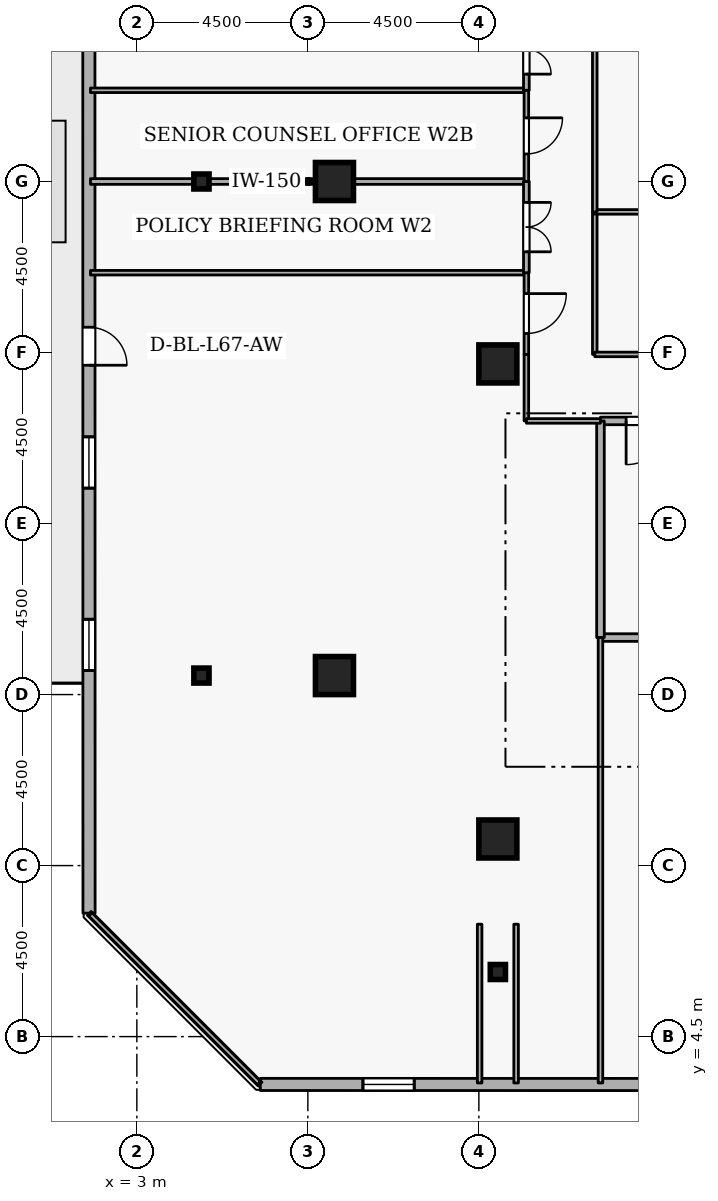
"""IFC4 building model, lengths in metres.
Left out: names, types, materials, properties, quantities, classifications, styles, units other than length and angle.
Written with IfcOpenShell. Run it as: python <this file> out.ifc"""

import sys

from ifc_helpers import new_model, si_unit, direction, frame, frame_2d, origin, origin_2d, place, context, subcontext, project, spatial, rectangle, i_section, extrude, element, fill, save


model = new_model("IFC4")
c1 = context("Model", 3, precision=1e-05, world=origin(), true_north=direction((0.0, 1.0)))
c2 = subcontext(c1, "Body", "Model", "MODEL_VIEW")
j1 = project(units=[si_unit("LENGTHUNIT", "METRE"), si_unit("PLANEANGLEUNIT", "RADIAN")], contexts=[c1])
p1 = place(None, origin())
s1 = spatial("IfcSite", under=j1, at=p1, CompositionType="ELEMENT")
p2 = place(p1, origin())
s2 = spatial("IfcBuilding", under=s1, at=p2, CompositionType="ELEMENT")
p3 = place(p2, frame((0.0, 0.0, 251.1)))
s3 = spatial("IfcBuildingStorey", under=s2, at=p3, CompositionType="ELEMENT", Elevation=251.1)
for number, where, z_axis, x_axis in (
    (1, (12.5, 9.7, 0.0), (0.0, 0.0, 1.0), (1.0, 0.0, 0.0)),
    (2, (8.2, 14.0, 0.0), (0.0, 0.0, 1.0), (1.0, 0.0, 0.0)),
    (3, (8.2, 27.0, 0.0), (0.0, 0.0, 1.0), (1.0, 0.0, 0.0)),
    (4, (12.5, 22.2, 0.0), (0.0, 0.0, 1.0), (1.0, 0.0, 0.0)),
):
    element("IfcColumn", number, at=place(p3, frame(where, z_axis=z_axis, x_axis=x_axis)), inside=s3, PredefinedType="COLUMN", context=c2, shape_type="SweptSolid", body=[
        extrude(rectangle(XDim=1.0, YDim=1.0, at=origin_2d()), origin(), (0.0, 0.0, 1.0), 3.6),
    ])
for number, where, z_axis, x_axis in (
    (5, (12.5, 6.2, 0.0), (0.0, 0.0, 1.0), (1.0, 0.0, 0.0)),
    (6, (4.7, 14.0, 0.0), (0.0, 0.0, 1.0), (1.0, 0.0, 0.0)),
    (7, (4.7, 27.0, 0.0), (0.0, 0.0, 1.0), (1.0, 0.0, 0.0)),
):
    element("IfcColumn", number, at=place(p3, frame(where, z_axis=z_axis, x_axis=x_axis)), inside=s3, PredefinedType="COLUMN", context=c2, shape_type="SweptSolid", body=[
        extrude(i_section(OverallWidth=0.399, OverallDepth=0.394, WebThickness=0.023, FlangeThickness=0.037, FilletRadius=0.015, at=origin_2d()), origin(), (0.0, 0.0, 1.0), 3.6),
    ])
p4 = place(p3, frame((6.249, 3.242, 0.0), z_axis=(0.0, 0.0, 1.0), x_axis=(0.999999983007, -0.000184351399, 0.0)))
e8 = element("IfcWall", 8, at=p4, inside=s3, PredefinedType="STANDARD", context=c2, shape_type="SweptSolid", body=[
    extrude(rectangle(XDim=34.432, YDim=0.32, at=frame_2d((17.216, 0.0))), origin(), (0.0, 0.0, 1.0), 2.22),
])
p5 = place(p4, frame((2.7, 0.0, 0.72)))
e9 = element("IfcOpeningElement", 9, at=p5, cuts=e8, PredefinedType="OPENING", context=c2, shape_type="SweptSolid", body=[
    extrude(rectangle(XDim=1.35, YDim=1.05, at=frame_2d((0.675, 0.525))), frame((0.0, 0.17, 0.0), z_axis=(0.0, -1.0, 0.0), x_axis=(1.0, 0.0, 0.0)), (0.0, 0.0, 1.0), 0.34),
])
p6 = place(p4, frame((12.3, 0.0, 0.72)))
e10 = element("IfcOpeningElement", 10, at=p6, cuts=e8, PredefinedType="OPENING", context=c2, shape_type="SweptSolid", body=[
    extrude(rectangle(XDim=1.35, YDim=1.05, at=frame_2d((0.675, 0.525))), frame((0.0, 0.17, 0.0), z_axis=(0.0, -1.0, 0.0), x_axis=(1.0, 0.0, 0.0)), (0.0, 0.0, 1.0), 0.34),
])
p7 = place(p4, frame((17.1, 0.0, 0.72)))
e11 = element("IfcOpeningElement", 11, at=p7, cuts=e8, PredefinedType="OPENING", context=c2, shape_type="SweptSolid", body=[
    extrude(rectangle(XDim=1.35, YDim=1.05, at=frame_2d((0.675, 0.525))), frame((0.0, 0.17, 0.0), z_axis=(0.0, -1.0, 0.0), x_axis=(1.0, 0.0, 0.0)), (0.0, 0.0, 1.0), 0.34),
])
p8 = place(p4, frame((21.9, 0.0, 0.72)))
e12 = element("IfcOpeningElement", 12, at=p8, cuts=e8, PredefinedType="OPENING", context=c2, shape_type="SweptSolid", body=[
    extrude(rectangle(XDim=1.35, YDim=1.05, at=frame_2d((0.675, 0.525))), frame((0.0, 0.17, 0.0), z_axis=(0.0, -1.0, 0.0), x_axis=(1.0, 0.0, 0.0)), (0.0, 0.0, 1.0), 0.34),
])
p9 = place(p3, frame((1.735, 42.181, 0.0), z_axis=(0.0, 0.0, 1.0), x_axis=(0.000184351399, -0.999999983007, 0.0)))
e13 = element("IfcWall", 13, at=p9, inside=s3, PredefinedType="STANDARD", context=c2, shape_type="SweptSolid", body=[
    extrude(rectangle(XDim=34.432, YDim=0.32, at=frame_2d((17.216, 0.0))), origin(), (0.0, 0.0, 1.0), 2.22),
])
p10 = place(p9, frame((19.016, 0.0, 0.0)))
e14 = element("IfcOpeningElement", 14, at=p10, cuts=e13, PredefinedType="OPENING", context=c2, shape_type="SweptSolid", body=[
    extrude(rectangle(XDim=1.0, YDim=2.08, at=frame_2d((0.5, 1.04))), frame((0.0, 0.17, 0.0), z_axis=(0.0, -1.0, 0.0), x_axis=(1.0, 0.0, 0.0)), (0.0, 0.0, 1.0), 0.34),
])
p11 = place(p9, frame((2.7, 0.0, 0.72)))
e15 = element("IfcOpeningElement", 15, at=p11, cuts=e13, PredefinedType="OPENING", context=c2, shape_type="SweptSolid", body=[
    extrude(rectangle(XDim=1.35, YDim=1.05, at=frame_2d((0.675, 0.525))), frame((0.0, 0.17, 0.0), z_axis=(0.0, -1.0, 0.0), x_axis=(1.0, 0.0, 0.0)), (0.0, 0.0, 1.0), 0.34),
])
p12 = place(p9, frame((7.5, 0.0, 0.72)))
e16 = element("IfcOpeningElement", 16, at=p12, cuts=e13, PredefinedType="OPENING", context=c2, shape_type="SweptSolid", body=[
    extrude(rectangle(XDim=1.35, YDim=1.05, at=frame_2d((0.675, 0.525))), frame((0.0, 0.17, 0.0), z_axis=(0.0, -1.0, 0.0), x_axis=(1.0, 0.0, 0.0)), (0.0, 0.0, 1.0), 0.34),
])
p13 = place(p9, frame((21.9, 0.0, 0.72)))
e17 = element("IfcOpeningElement", 17, at=p13, cuts=e13, PredefinedType="OPENING", context=c2, shape_type="SweptSolid", body=[
    extrude(rectangle(XDim=1.35, YDim=1.05, at=frame_2d((0.675, 0.525))), frame((0.0, 0.17, 0.0), z_axis=(0.0, -1.0, 0.0), x_axis=(1.0, 0.0, 0.0)), (0.0, 0.0, 1.0), 0.34),
])
p14 = place(p9, frame((26.7, 0.0, 0.72)))
e18 = element("IfcOpeningElement", 18, at=p14, cuts=e13, PredefinedType="OPENING", context=c2, shape_type="SweptSolid", body=[
    extrude(rectangle(XDim=1.35, YDim=1.05, at=frame_2d((0.675, 0.525))), frame((0.0, 0.17, 0.0), z_axis=(0.0, -1.0, 0.0), x_axis=(1.0, 0.0, 0.0)), (0.0, 0.0, 1.0), 0.34),
])
p15 = place(p3, frame((15.2, 15.0, 0.0), z_axis=(0.0, 0.0, 1.0), x_axis=(1.0, 0.0, 0.0)))
e19 = element("IfcWall", 19, at=p15, inside=s3, PredefinedType="STANDARD", context=c2, shape_type="SweptSolid", body=[
    extrude(rectangle(XDim=2.5, YDim=0.2, at=frame_2d((1.25, 0.0))), origin(), (0.0, 0.0, 1.0), 3.32),
])
p16 = place(p3, frame((17.7, 20.7, 0.0), z_axis=(0.0, 0.0, 1.0), x_axis=(-1.0, 0.0, 0.0)))
e20 = element("IfcWall", 20, at=p16, inside=s3, PredefinedType="STANDARD", context=c2, shape_type="SweptSolid", body=[
    extrude(rectangle(XDim=2.5, YDim=0.2, at=frame_2d((1.25, 0.0))), origin(), (0.0, 0.0, 1.0), 3.32),
])
p17 = place(p16, frame((0.675, 0.0, 0.0)))
e21 = element("IfcOpeningElement", 21, at=p17, cuts=e20, PredefinedType="OPENING", context=c2, shape_type="SweptSolid", body=[
    extrude(rectangle(XDim=1.15, YDim=2.1, at=frame_2d((0.575, 1.05))), frame((0.0, 0.11, 0.0), z_axis=(0.0, -1.0, 0.0), x_axis=(1.0, 0.0, 0.0)), (0.0, 0.0, 1.0), 0.22),
])
p18 = place(p3, frame((15.2, 20.7, 0.0), z_axis=(0.0, 0.0, 1.0), x_axis=(0.0, -1.0, 0.0)))
e22 = element("IfcWall", 22, at=p18, inside=s3, PredefinedType="STANDARD", context=c2, shape_type="SweptSolid", body=[
    extrude(rectangle(XDim=5.7, YDim=0.2, at=frame_2d((2.85, 0.0))), origin(), (0.0, 0.0, 1.0), 3.32),
])
p19 = place(p3, frame((13.25, 22.45, 0.0), z_axis=(0.0, 0.0, 1.0), x_axis=(0.0, -1.0, 0.0)))
e23 = element("IfcWall", 23, at=p19, inside=s3, PredefinedType="PARTITIONING", context=c2, shape_type="SweptSolid", body=[
    extrude(rectangle(XDim=1.75, YDim=0.12, at=frame_2d((0.875, 0.0))), origin(), (0.0, 0.0, 1.0), 3.32),
])
p20 = place(p3, frame((13.25, 20.7, 0.0), z_axis=(0.0, 0.0, 1.0), x_axis=(1.0, 0.0, 0.0)))
e24 = element("IfcWall", 24, at=p20, inside=s3, PredefinedType="PARTITIONING", context=c2, shape_type="SweptSolid", body=[
    extrude(rectangle(XDim=1.95, YDim=0.12, at=frame_2d((0.975, 0.0))), origin(), (0.0, 0.0, 1.0), 3.32),
])
p21 = place(p3, frame((15.2, 15.0, 0.0), z_axis=(0.0, 0.0, 1.0), x_axis=(0.0, -1.0, 0.0)))
e25 = element("IfcWall", 25, at=p21, inside=s3, PredefinedType="PARTITIONING", context=c2, shape_type="SweptSolid", body=[
    extrude(rectangle(XDim=11.72, YDim=0.12, at=frame_2d((5.86, 0.0))), origin(), (0.0, 0.0, 1.0), 3.32),
])
for number, where, z_axis, x_axis in (
    (26, (12.98, 3.28, 0.0), (0.0, 0.0, 1.0), (0.0, 1.0, 0.0)),
    (27, (12.02, 7.458, 0.0), (0.0, 0.0, 1.0), (0.0, -1.0, 0.0)),
):
    element("IfcWall", number, at=place(p3, frame(where, z_axis=z_axis, x_axis=x_axis)), inside=s3, PredefinedType="PARTITIONING", context=c2, shape_type="SweptSolid", body=[
        extrude(rectangle(XDim=4.178, YDim=0.12, at=frame_2d((2.089, 0.0))), origin(), (0.0, 0.0, 1.0), 1.785),
    ])
p22 = place(p3, frame((6.213, 3.28, 0.0), z_axis=(0.0, 0.0, 1.0), x_axis=(-0.707106781187, 0.707106781187, 0.0)))
e28 = element("IfcWall", 28, at=p22, inside=s3, PredefinedType="PARTITIONING", context=c2, shape_type="SweptSolid", body=[
    extrude(rectangle(XDim=6.269, YDim=0.12, at=frame_2d((3.134, 0.0))), origin(), (0.0, 0.0, 1.0), 3.32),
])
p23 = place(p3, frame((1.78, 24.6, 0.0), z_axis=(0.0, 0.0, 1.0), x_axis=(1.0, 0.0, 0.0)))
e29 = element("IfcWall", 29, at=p23, inside=s3, PredefinedType="PARTITIONING", context=c2, shape_type="SweptSolid", body=[
    extrude(rectangle(XDim=11.47, YDim=0.12, at=frame_2d((5.735, 0.0))), origin(), (0.0, 0.0, 1.0), 3.32),
])
p24 = place(p3, frame((13.25, 24.6, 0.0), z_axis=(0.0, 0.0, 1.0), x_axis=(0.0, -1.0, 0.0)))
e30 = element("IfcWall", 30, at=p24, inside=s3, PredefinedType="PARTITIONING", context=c2, shape_type="SweptSolid", body=[
    extrude(rectangle(XDim=2.15, YDim=0.12, at=frame_2d((1.075, 0.0))), origin(), (0.0, 0.0, 1.0), 3.32),
])
p25 = place(p24, frame((0.55, 0.0, 0.0)))
e31 = element("IfcOpeningElement", 31, at=p25, cuts=e30, PredefinedType="OPENING", context=c2, shape_type="SweptSolid", body=[
    extrude(rectangle(XDim=1.05, YDim=2.1, at=frame_2d((0.525, 1.05))), frame((0.0, 0.07, 0.0), z_axis=(0.0, -1.0, 0.0), x_axis=(1.0, 0.0, 0.0)), (0.0, 0.0, 1.0), 0.14),
])
p26 = place(p3, frame((1.78, 27.0, 0.0), z_axis=(0.0, 0.0, 1.0), x_axis=(1.0, 0.0, 0.0)))
e32 = element("IfcWall", 32, at=p26, inside=s3, PredefinedType="PARTITIONING", context=c2, shape_type="SweptSolid", body=[
    extrude(rectangle(XDim=11.47, YDim=0.15, at=frame_2d((5.735, 0.0))), origin(), (0.0, 0.0, 1.0), 2.862),
])
p27 = place(p3, frame((13.25, 27.0, 0.0), z_axis=(0.0, 0.0, 1.0), x_axis=(0.0, -1.0, 0.0)))
e33 = element("IfcWall", 33, at=p27, inside=s3, PredefinedType="PARTITIONING", context=c2, shape_type="SweptSolid", body=[
    extrude(rectangle(XDim=2.4, YDim=0.15, at=frame_2d((1.2, 0.0))), origin(), (0.0, 0.0, 1.0), 3.32),
])
p28 = place(p27, frame((0.55, 0.0, 0.0)))
e34 = element("IfcOpeningElement", 34, at=p28, cuts=e33, PredefinedType="OPENING", context=c2, shape_type="SweptSolid", body=[
    extrude(rectangle(XDim=1.3, YDim=2.12, at=frame_2d((0.65, 1.06))), frame((0.0, 0.085, 0.0), z_axis=(0.0, -1.0, 0.0), x_axis=(1.0, 0.0, 0.0)), (0.0, 0.0, 1.0), 0.17),
])
p29 = place(p3, frame((1.78, 29.4, 0.0), z_axis=(0.0, 0.0, 1.0), x_axis=(1.0, 0.0, 0.0)))
e35 = element("IfcWall", 35, at=p29, inside=s3, PredefinedType="PARTITIONING", context=c2, shape_type="SweptSolid", body=[
    extrude(rectangle(XDim=11.47, YDim=0.12, at=frame_2d((5.735, 0.0))), origin(), (0.0, 0.0, 1.0), 3.32),
])
p30 = place(p3, frame((13.25, 29.4, 0.0), z_axis=(0.0, 0.0, 1.0), x_axis=(0.0, -1.0, 0.0)))
e36 = element("IfcWall", 36, at=p30, inside=s3, PredefinedType="PARTITIONING", context=c2, shape_type="SweptSolid", body=[
    extrude(rectangle(XDim=2.4, YDim=0.12, at=frame_2d((1.2, 0.0))), origin(), (0.0, 0.0, 1.0), 3.32),
])
p31 = place(p30, frame((0.725, 0.0, 0.0)))
e37 = element("IfcOpeningElement", 37, at=p31, cuts=e36, PredefinedType="OPENING", context=c2, shape_type="SweptSolid", body=[
    extrude(rectangle(XDim=0.95, YDim=2.1, at=frame_2d((0.475, 1.05))), frame((0.0, 0.07, 0.0), z_axis=(0.0, -1.0, 0.0), x_axis=(1.0, 0.0, 0.0)), (0.0, 0.0, 1.0), 0.14),
])
p32 = place(p3, frame((13.25, 31.55, 0.0), z_axis=(0.0, 0.0, 1.0), x_axis=(0.0, -1.0, 0.0)))
e38 = element("IfcWall", 38, at=p32, inside=s3, PredefinedType="PARTITIONING", context=c2, shape_type="SweptSolid", body=[
    extrude(rectangle(XDim=2.15, YDim=0.15, at=frame_2d((1.075, 0.0))), origin(), (0.0, 0.0, 1.0), 3.32),
])
p33 = place(p32, frame((0.425, 0.0, 0.0)))
e39 = element("IfcOpeningElement", 39, at=p33, cuts=e38, PredefinedType="OPENING", context=c2, shape_type="SweptSolid", body=[
    extrude(rectangle(XDim=1.3, YDim=2.12, at=frame_2d((0.65, 1.06))), frame((0.0, 0.085, 0.0), z_axis=(0.0, -1.0, 0.0), x_axis=(1.0, 0.0, 0.0)), (0.0, 0.0, 1.0), 0.17),
])
p34 = place(p3, frame((15.05, 22.45, 0.0), z_axis=(0.0, 0.0, 1.0), x_axis=(0.0, 1.0, 0.0)))
e40 = element("IfcWall", 40, at=p34, inside=s3, PredefinedType="PARTITIONING", context=c2, shape_type="SweptSolid", body=[
    extrude(rectangle(XDim=3.75, YDim=0.12, at=frame_2d((1.875, 0.0))), origin(), (0.0, 0.0, 1.0), 3.32),
])
p35 = place(p3, frame((15.05, 26.2, 0.0), z_axis=(0.0, 0.0, 1.0), x_axis=(1.0, 0.0, 0.0)))
e41 = element("IfcWall", 41, at=p35, inside=s3, PredefinedType="PARTITIONING", context=c2, shape_type="SweptSolid", body=[
    extrude(rectangle(XDim=5.85, YDim=0.12, at=frame_2d((2.925, 0.0))), origin(), (0.0, 0.0, 1.0), 3.32),
])
p36 = place(p3, frame((20.9, 22.45, 0.0), z_axis=(0.0, 0.0, 1.0), x_axis=(-1.0, 0.0, 0.0)))
e42 = element("IfcWall", 42, at=p36, inside=s3, PredefinedType="PARTITIONING", context=c2, shape_type="SweptSolid", body=[
    extrude(rectangle(XDim=5.85, YDim=0.12, at=frame_2d((2.925, 0.0))), origin(), (0.0, 0.0, 1.0), 3.32),
])
p37 = place(p36, frame((2.45, 0.0, 0.0)))
e43 = element("IfcOpeningElement", 43, at=p37, cuts=e42, PredefinedType="OPENING", context=c2, shape_type="SweptSolid", body=[
    extrude(rectangle(XDim=0.95, YDim=2.1, at=frame_2d((0.475, 1.05))), frame((0.0, 0.07, 0.0), z_axis=(0.0, -1.0, 0.0), x_axis=(1.0, 0.0, 0.0)), (0.0, 0.0, 1.0), 0.14),
])
p38 = place(p3, frame((15.05, 26.2, 0.0), z_axis=(0.0, 0.0, 1.0), x_axis=(0.0, 1.0, 0.0)))
e44 = element("IfcWall", 44, at=p38, inside=s3, PredefinedType="PARTITIONING", context=c2, shape_type="SweptSolid", body=[
    extrude(rectangle(XDim=5.35, YDim=0.12, at=frame_2d((2.675, 0.0))), origin(), (0.0, 0.0, 1.0), 3.32),
])
p39 = place(p5, origin())
e45 = element("IfcWindow", 45, at=p39, inside=s3, PartitioningType="SINGLE_PANEL", PredefinedType="WINDOW", context=c2, shape_type="SweptSolid", body=[
    extrude(rectangle(XDim=1.35, YDim=1.05, at=frame_2d((0.675, 0.525))), frame((0.0, 0.03, 0.0), z_axis=(0.0, -1.0, 0.0), x_axis=(1.0, 0.0, 0.0)), (0.0, 0.0, 1.0), 0.06),
])
fill(e9, e45)
p40 = place(p10, origin())
e46 = element("IfcDoor", 46, at=p40, inside=s3, OperationType="SINGLE_SWING_RIGHT", PredefinedType="DOOR", context=c2, shape_type="SweptSolid", body=[
    extrude(rectangle(XDim=1.0, YDim=2.08, at=frame_2d((0.5, 1.04))), frame((0.0, 0.025, 0.0), z_axis=(0.0, -1.0, 0.0), x_axis=(1.0, 0.0, 0.0)), (0.0, 0.0, 1.0), 0.05),
])
fill(e14, e46)
p41 = place(p13, origin())
e47 = element("IfcWindow", 47, at=p41, inside=s3, PartitioningType="SINGLE_PANEL", PredefinedType="WINDOW", context=c2, shape_type="SweptSolid", body=[
    extrude(rectangle(XDim=1.35, YDim=1.05, at=frame_2d((0.675, 0.525))), frame((0.0, 0.03, 0.0), z_axis=(0.0, -1.0, 0.0), x_axis=(1.0, 0.0, 0.0)), (0.0, 0.0, 1.0), 0.06),
])
fill(e17, e47)
p42 = place(p14, origin())
e48 = element("IfcWindow", 48, at=p42, inside=s3, PartitioningType="SINGLE_PANEL", PredefinedType="WINDOW", context=c2, shape_type="SweptSolid", body=[
    extrude(rectangle(XDim=1.35, YDim=1.05, at=frame_2d((0.675, 0.525))), frame((0.0, 0.03, 0.0), z_axis=(0.0, -1.0, 0.0), x_axis=(1.0, 0.0, 0.0)), (0.0, 0.0, 1.0), 0.06),
])
fill(e18, e48)
p43 = place(p17, origin())
e49 = element("IfcDoor", 49, at=p43, inside=s3, OperationType="SINGLE_SWING_RIGHT", PredefinedType="DOOR", context=c2, shape_type="SweptSolid", body=[
    extrude(rectangle(XDim=1.15, YDim=2.1, at=frame_2d((0.575, 1.05))), frame((0.0, 0.025, 0.0), z_axis=(0.0, -1.0, 0.0), x_axis=(1.0, 0.0, 0.0)), (0.0, 0.0, 1.0), 0.05),
])
fill(e21, e49)
p44 = place(p25, origin())
e50 = element("IfcDoor", 50, at=p44, inside=s3, OperationType="SINGLE_SWING_LEFT", PredefinedType="DOOR", context=c2, shape_type="SweptSolid", body=[
    extrude(rectangle(XDim=1.05, YDim=2.1, at=frame_2d((0.525, 1.05))), frame((0.0, 0.025, 0.0), z_axis=(0.0, -1.0, 0.0), x_axis=(1.0, 0.0, 0.0)), (0.0, 0.0, 1.0), 0.05),
])
fill(e31, e50)
p45 = place(p28, origin())
e51 = element("IfcDoor", 51, at=p45, inside=s3, OperationType="DOUBLE_DOOR_SINGLE_SWING", PredefinedType="DOOR", context=c2, shape_type="SweptSolid", body=[
    extrude(rectangle(XDim=1.3, YDim=2.12, at=frame_2d((0.65, 1.06))), frame((0.0, 0.025, 0.0), z_axis=(0.0, -1.0, 0.0), x_axis=(1.0, 0.0, 0.0)), (0.0, 0.0, 1.0), 0.05),
])
fill(e34, e51)
p46 = place(p31, origin())
e52 = element("IfcDoor", 52, at=p46, inside=s3, OperationType="SINGLE_SWING_LEFT", PredefinedType="DOOR", context=c2, shape_type="SweptSolid", body=[
    extrude(rectangle(XDim=0.95, YDim=2.1, at=frame_2d((0.475, 1.05))), frame((0.0, 0.025, 0.0), z_axis=(0.0, -1.0, 0.0), x_axis=(1.0, 0.0, 0.0)), (0.0, 0.0, 1.0), 0.05),
])
fill(e37, e52)
p47 = place(p33, origin())
e53 = element("IfcDoor", 53, at=p47, inside=s3, OperationType="DOUBLE_DOOR_SINGLE_SWING", PredefinedType="DOOR", context=c2, shape_type="SweptSolid", body=[
    extrude(rectangle(XDim=1.3, YDim=2.12, at=frame_2d((0.65, 1.06))), frame((0.0, 0.025, 0.0), z_axis=(0.0, -1.0, 0.0), x_axis=(1.0, 0.0, 0.0)), (0.0, 0.0, 1.0), 0.05),
])
fill(e39, e53)
save(model, sys.argv[1])
